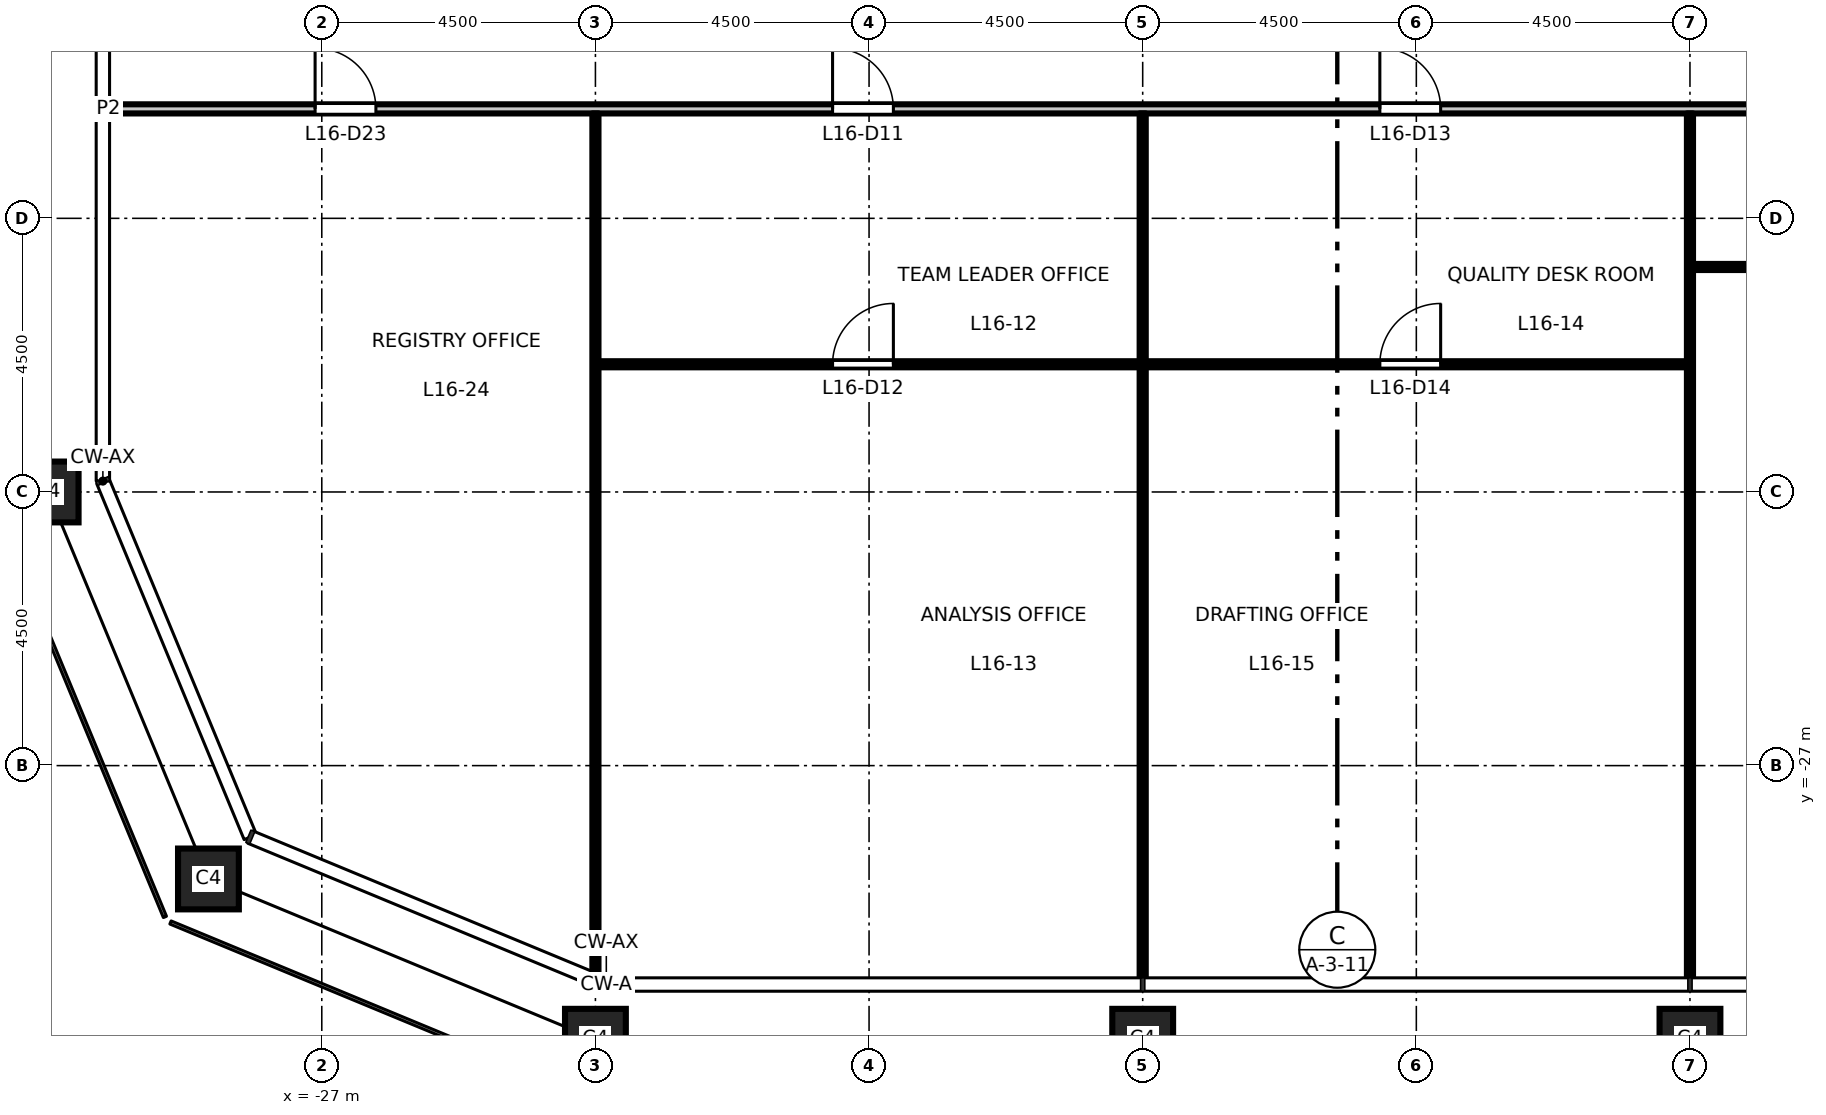
"""IFC4 building model, lengths in metres.
Left out: names, types, materials, properties, quantities, classifications, styles, units other than length and angle.
Written with IfcOpenShell. Run it as: python <this file> out.ifc"""

import sys

from ifc_helpers import new_model, si_unit, direction, frame, frame_2d, origin, origin_2d, place, context, subcontext, project, spatial, rectangle, hollow_rectangle, extrude, element, fill, save


model = new_model("IFC4")
c1 = context("Model", 3, precision=1e-05, world=origin(), true_north=direction((0.0, 1.0)))
c2 = subcontext(c1, "Body", "Model", "MODEL_VIEW")
j1 = project(units=[si_unit("LENGTHUNIT", "METRE"), si_unit("PLANEANGLEUNIT", "RADIAN")], contexts=[c1])
p1 = place(None, origin())
s1 = spatial("IfcSite", under=j1, at=p1, CompositionType="ELEMENT")
p2 = place(p1, origin())
s2 = spatial("IfcBuilding", under=s1, at=p2, CompositionType="ELEMENT")
p3 = place(p2, frame((0.0, 0.0, 76.2)))
s3 = spatial("IfcBuildingStorey", under=s2, at=p3, CompositionType="ELEMENT", Elevation=76.2)
for number, where, z_axis, x_axis in (
    (1, (-22.5, -31.5, 0.0), (0.0, 0.0, 1.0), (1.0, 0.0, 0.0)),
    (2, (-13.5, -31.5, 0.0), (0.0, 0.0, 1.0), (1.0, 0.0, 0.0)),
    (3, (-4.5, -31.5, 0.0), (0.0, 0.0, 1.0), (1.0, 0.0, 0.0)),
    (4, (-31.5, -22.5, 0.0), (0.0, 0.0, 1.0), (1.0, 0.0, 0.0)),
    (5, (-28.864, -28.864, 0.0), (0.0, 0.0, 1.0), (1.0, 0.0, 0.0)),
):
    element("IfcColumn", number, at=place(p3, frame(where, z_axis=z_axis, x_axis=x_axis)), inside=s3, PredefinedType="COLUMN", context=c2, shape_type="SweptSolid", body=[
        extrude(hollow_rectangle(XDim=1.0, YDim=1.0, WallThickness=0.06, at=origin_2d()), origin(), (0.0, 0.0, 1.0), 4.5),
    ])
p4 = place(p3, frame((-22.45, -20.4, 0.0), z_axis=(0.0, 0.0, 1.0), x_axis=(1.0, 0.0, 0.0)))
e6 = element("IfcWall", 6, at=p4, inside=s3, PredefinedType="PARTITIONING", context=c2, shape_type="SweptSolid", body=[
    extrude(rectangle(XDim=17.9, YDim=0.1, at=frame_2d((8.95, 0.0))), origin(), (0.0, 0.0, 1.0), 4.35),
])
p5 = place(p4, frame((3.85, 0.0, 0.0)))
e7 = element("IfcOpeningElement", 7, at=p5, cuts=e6, PredefinedType="OPENING", context=c2, shape_type="SweptSolid", body=[
    extrude(rectangle(XDim=1.0, YDim=2.1, at=frame_2d((0.5, 1.05))), frame((0.0, 0.06, 0.0), z_axis=(0.0, -1.0, 0.0), x_axis=(1.0, 0.0, 0.0)), (0.0, 0.0, 1.0), 0.12),
])
p6 = place(p4, frame((12.85, 0.0, 0.0)))
e8 = element("IfcOpeningElement", 8, at=p6, cuts=e6, PredefinedType="OPENING", context=c2, shape_type="SweptSolid", body=[
    extrude(rectangle(XDim=1.0, YDim=2.1, at=frame_2d((0.5, 1.05))), frame((0.0, 0.06, 0.0), z_axis=(0.0, -1.0, 0.0), x_axis=(1.0, 0.0, 0.0)), (0.0, 0.0, 1.0), 0.12),
])
p7 = place(p3, frame((-4.45, -18.8, 0.0), z_axis=(0.0, 0.0, 1.0), x_axis=(1.0, 0.0, 0.0)))
e9 = element("IfcWall", 9, at=p7, inside=s3, PredefinedType="PARTITIONING", context=c2, shape_type="SweptSolid", body=[
    extrude(rectangle(XDim=8.9, YDim=0.1, at=frame_2d((4.45, 0.0))), origin(), (0.0, 0.0, 1.0), 4.35),
])
p8 = place(p7, frame((3.85, 0.0, 0.0)))
e10 = element("IfcOpeningElement", 10, at=p8, cuts=e9, PredefinedType="OPENING", context=c2, shape_type="SweptSolid", body=[
    extrude(rectangle(XDim=1.0, YDim=2.1, at=frame_2d((0.5, 1.05))), frame((0.0, 0.06, 0.0), z_axis=(0.0, -1.0, 0.0), x_axis=(1.0, 0.0, 0.0)), (0.0, 0.0, 1.0), 0.12),
])
p9 = place(p3, frame((-30.51, -16.2, 0.0), z_axis=(0.0, 0.0, 1.0), x_axis=(1.0, 0.0, 0.0)))
e11 = element("IfcWall", 11, at=p9, inside=s3, PredefinedType="PARTITIONING", context=c2, shape_type="SweptSolid", body=[
    extrude(rectangle(XDim=61.02, YDim=0.15, at=frame_2d((30.51, 0.0))), origin(), (0.0, 0.0, 1.0), 4.35),
])
p10 = place(p9, frame((11.91, 0.0, 0.0)))
e12 = element("IfcOpeningElement", 12, at=p10, cuts=e11, PredefinedType="OPENING", context=c2, shape_type="SweptSolid", body=[
    extrude(rectangle(XDim=1.0, YDim=2.1, at=frame_2d((0.5, 1.05))), frame((0.0, 0.085, 0.0), z_axis=(0.0, -1.0, 0.0), x_axis=(1.0, 0.0, 0.0)), (0.0, 0.0, 1.0), 0.17),
])
p11 = place(p9, frame((20.91, 0.0, 0.0)))
e13 = element("IfcOpeningElement", 13, at=p11, cuts=e11, PredefinedType="OPENING", context=c2, shape_type="SweptSolid", body=[
    extrude(rectangle(XDim=1.0, YDim=2.1, at=frame_2d((0.5, 1.05))), frame((0.0, 0.085, 0.0), z_axis=(0.0, -1.0, 0.0), x_axis=(1.0, 0.0, 0.0)), (0.0, 0.0, 1.0), 0.17),
])
p12 = place(p9, frame((29.91, 0.0, 0.0)))
e14 = element("IfcOpeningElement", 14, at=p12, cuts=e11, PredefinedType="OPENING", context=c2, shape_type="SweptSolid", body=[
    extrude(rectangle(XDim=1.0, YDim=2.1, at=frame_2d((0.5, 1.05))), frame((0.0, 0.085, 0.0), z_axis=(0.0, -1.0, 0.0), x_axis=(1.0, 0.0, 0.0)), (0.0, 0.0, 1.0), 0.17),
])
p13 = place(p9, frame((38.91, 0.0, 0.0)))
e15 = element("IfcOpeningElement", 15, at=p13, cuts=e11, PredefinedType="OPENING", context=c2, shape_type="SweptSolid", body=[
    extrude(rectangle(XDim=1.0, YDim=2.1, at=frame_2d((0.5, 1.05))), frame((0.0, 0.085, 0.0), z_axis=(0.0, -1.0, 0.0), x_axis=(1.0, 0.0, 0.0)), (0.0, 0.0, 1.0), 0.17),
])
p14 = place(p9, frame((47.91, 0.0, 0.0)))
e16 = element("IfcOpeningElement", 16, at=p14, cuts=e11, PredefinedType="OPENING", context=c2, shape_type="SweptSolid", body=[
    extrude(rectangle(XDim=1.0, YDim=2.1, at=frame_2d((0.5, 1.05))), frame((0.0, 0.085, 0.0), z_axis=(0.0, -1.0, 0.0), x_axis=(1.0, 0.0, 0.0)), (0.0, 0.0, 1.0), 0.17),
])
p15 = place(p9, frame((3.4, 0.0, 0.0)))
e17 = element("IfcOpeningElement", 17, at=p15, cuts=e11, PredefinedType="OPENING", context=c2, shape_type="SweptSolid", body=[
    extrude(rectangle(XDim=1.0, YDim=2.1, at=frame_2d((0.5, 1.05))), frame((0.0, 0.085, 0.0), z_axis=(0.0, -1.0, 0.0), x_axis=(1.0, 0.0, 0.0)), (0.0, 0.0, 1.0), 0.17),
])
p16 = place(p9, frame((56.41, 0.0, 0.0)))
e18 = element("IfcOpeningElement", 18, at=p16, cuts=e11, PredefinedType="OPENING", context=c2, shape_type="SweptSolid", body=[
    extrude(rectangle(XDim=1.0, YDim=2.1, at=frame_2d((0.5, 1.05))), frame((0.0, 0.085, 0.0), z_axis=(0.0, -1.0, 0.0), x_axis=(1.0, 0.0, 0.0)), (0.0, 0.0, 1.0), 0.17),
])
p17 = place(p3, frame((-22.5, -30.428, 0.0), z_axis=(0.0, 0.0, 1.0), x_axis=(0.0, 1.0, 0.0)))
e19 = element("IfcWall", 19, at=p17, inside=s3, PredefinedType="PARTITIONING", context=c2, shape_type="SweptSolid", body=[
    extrude(rectangle(XDim=14.153, YDim=0.1, at=frame_2d((7.077, 0.0))), origin(), (0.0, 0.0, 1.0), 3.35),
])
p18 = place(p3, frame((-13.5, -30.51, 0.0), z_axis=(0.0, 0.0, 1.0), x_axis=(0.0, 1.0, 0.0)))
e20 = element("IfcWall", 20, at=p18, inside=s3, PredefinedType="PARTITIONING", context=c2, shape_type="SweptSolid", body=[
    extrude(rectangle(XDim=10.06, YDim=0.1, at=frame_2d((5.03, 0.0))), origin(), (0.0, 0.0, 1.0), 3.35),
])
p19 = place(p3, frame((-13.5, -20.35, 0.0), z_axis=(0.0, 0.0, 1.0), x_axis=(0.0, 1.0, 0.0)))
e21 = element("IfcWall", 21, at=p19, inside=s3, PredefinedType="PARTITIONING", context=c2, shape_type="SweptSolid", body=[
    extrude(rectangle(XDim=4.075, YDim=0.1, at=frame_2d((2.038, 0.0))), origin(), (0.0, 0.0, 1.0), 3.35),
])
p20 = place(p3, frame((-4.5, -30.51, 0.0), z_axis=(0.0, 0.0, 1.0), x_axis=(0.0, 1.0, 0.0)))
e22 = element("IfcWall", 22, at=p20, inside=s3, PredefinedType="PARTITIONING", context=c2, shape_type="SweptSolid", body=[
    extrude(rectangle(XDim=14.235, YDim=0.1, at=frame_2d((7.118, 0.0))), origin(), (0.0, 0.0, 1.0), 3.35),
])
p21 = place(p10, origin())
e23 = element("IfcDoor", 23, at=p21, inside=s3, OperationType="SINGLE_SWING_LEFT", PredefinedType="DOOR", context=c2, shape_type="SweptSolid", body=[
    extrude(rectangle(XDim=1.0, YDim=2.1, at=frame_2d((0.5, 1.05))), frame((0.0, 0.025, 0.0), z_axis=(0.0, -1.0, 0.0), x_axis=(1.0, 0.0, 0.0)), (0.0, 0.0, 1.0), 0.05),
])
fill(e12, e23)
p22 = place(p5, origin())
e24 = element("IfcDoor", 24, at=p22, inside=s3, OperationType="SINGLE_SWING_RIGHT", PredefinedType="DOOR", context=c2, shape_type="SweptSolid", body=[
    extrude(rectangle(XDim=1.0, YDim=2.1, at=frame_2d((0.5, 1.05))), frame((0.0, 0.025, 0.0), z_axis=(0.0, -1.0, 0.0), x_axis=(1.0, 0.0, 0.0)), (0.0, 0.0, 1.0), 0.05),
])
fill(e7, e24)
p23 = place(p11, origin())
e25 = element("IfcDoor", 25, at=p23, inside=s3, OperationType="SINGLE_SWING_LEFT", PredefinedType="DOOR", context=c2, shape_type="SweptSolid", body=[
    extrude(rectangle(XDim=1.0, YDim=2.1, at=frame_2d((0.5, 1.05))), frame((0.0, 0.025, 0.0), z_axis=(0.0, -1.0, 0.0), x_axis=(1.0, 0.0, 0.0)), (0.0, 0.0, 1.0), 0.05),
])
fill(e13, e25)
p24 = place(p6, origin())
e26 = element("IfcDoor", 26, at=p24, inside=s3, OperationType="SINGLE_SWING_RIGHT", PredefinedType="DOOR", context=c2, shape_type="SweptSolid", body=[
    extrude(rectangle(XDim=1.0, YDim=2.1, at=frame_2d((0.5, 1.05))), frame((0.0, 0.025, 0.0), z_axis=(0.0, -1.0, 0.0), x_axis=(1.0, 0.0, 0.0)), (0.0, 0.0, 1.0), 0.05),
])
fill(e8, e26)
p25 = place(p15, origin())
e27 = element("IfcDoor", 27, at=p25, inside=s3, OperationType="SINGLE_SWING_LEFT", PredefinedType="DOOR", context=c2, shape_type="SweptSolid", body=[
    extrude(rectangle(XDim=1.0, YDim=2.1, at=frame_2d((0.5, 1.05))), frame((0.0, 0.025, 0.0), z_axis=(0.0, -1.0, 0.0), x_axis=(1.0, 0.0, 0.0)), (0.0, 0.0, 1.0), 0.05),
])
fill(e17, e27)
save(model, sys.argv[1])
